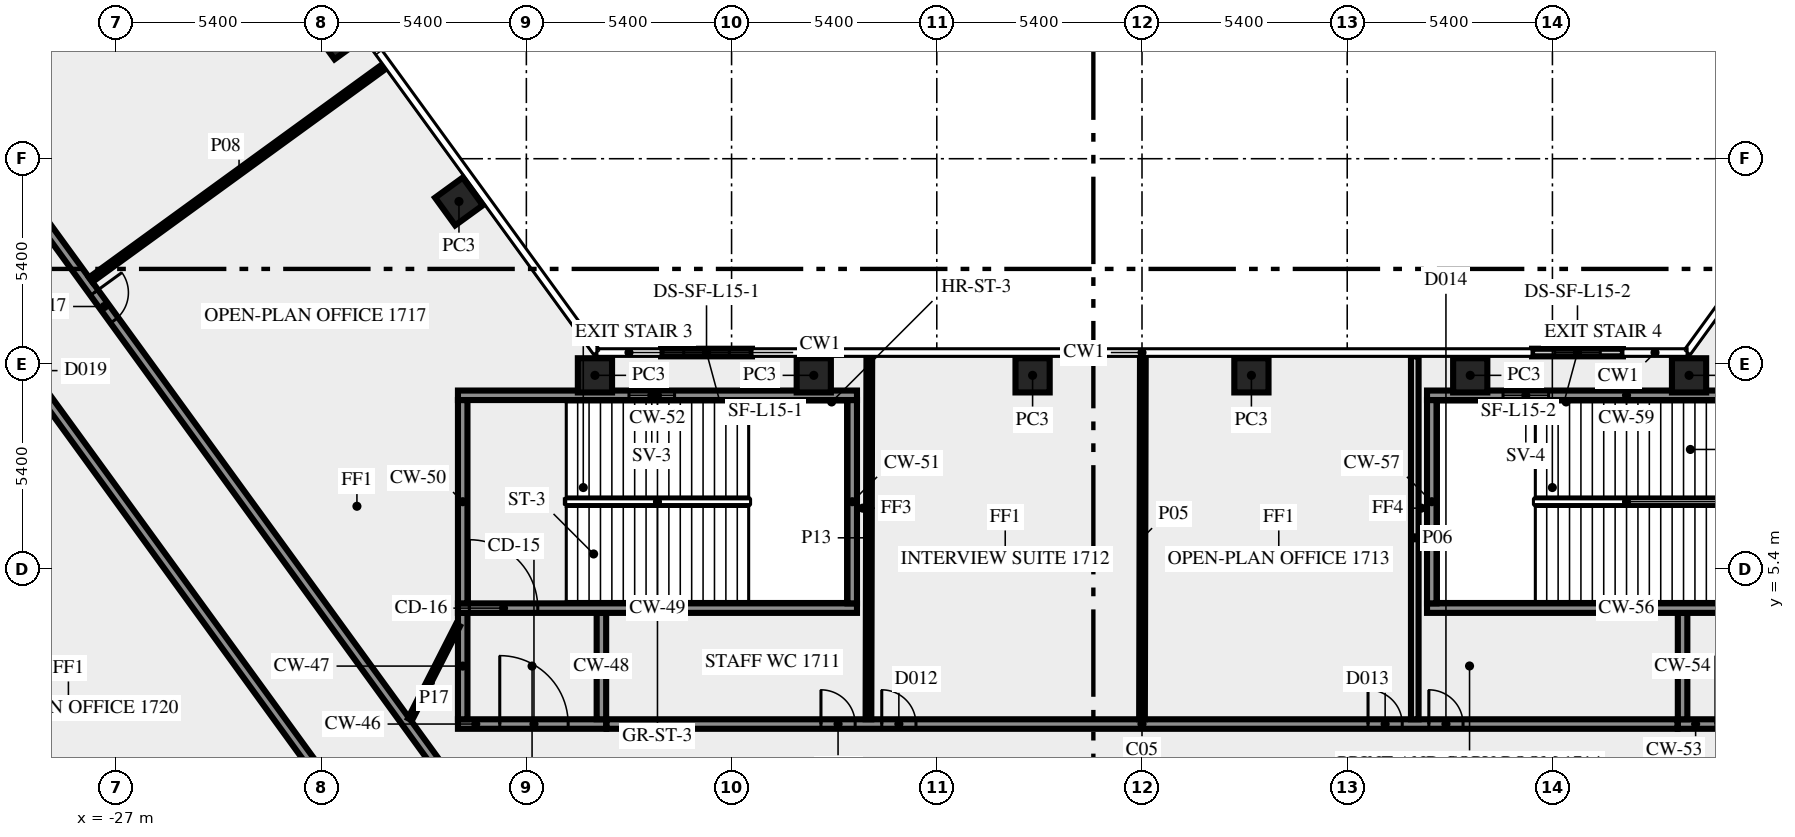
"""IFC4 building model, lengths in metres.
Left out: names, types, materials, properties, quantities, classifications, styles, units other than length and angle.
Written with IfcOpenShell. Run it as: python <this file> out.ifc"""

import sys

from ifc_helpers import new_model, si_unit, direction, frame, frame_2d, origin, origin_2d, place, context, subcontext, project, spatial, rectangle, extrude, element, fill, save


model = new_model("IFC4")
c1 = context("Model", 3, precision=1e-05, world=origin(), true_north=direction((0.0, 1.0)))
c2 = subcontext(c1, "Body", "Model", "MODEL_VIEW")
j1 = project(units=[si_unit("LENGTHUNIT", "METRE"), si_unit("PLANEANGLEUNIT", "RADIAN")], contexts=[c1])
p1 = place(None, origin())
s1 = spatial("IfcSite", under=j1, at=p1, CompositionType="ELEMENT")
p2 = place(p1, origin())
s2 = spatial("IfcBuilding", under=s1, at=p2, CompositionType="ELEMENT")
p3 = place(p2, frame((0.0, 0.0, 75.0)))
s3 = spatial("IfcBuildingStorey", under=s2, at=p3, CompositionType="ELEMENT", Elevation=75.0)
for number, where, z_axis, x_axis in (
    (1, (-17.974, 15.075, 0.0), (0.0, 0.0, 1.0), (-0.588, 0.809, 0.0)),
    (2, (-21.147, 19.444, 0.0), (0.0, 0.0, 1.0), (-0.588, 0.809, 0.0)),
    (3, (14.395, 10.5, 0.0), (0.0, 0.0, 1.0), (-1.0, 0.0, 0.0)),
    (4, (8.637, 10.5, 0.0), (0.0, 0.0, 1.0), (-1.0, 0.0, 0.0)),
    (5, (2.879, 10.5, 0.0), (0.0, 0.0, 1.0), (-1.0, 0.0, 0.0)),
    (6, (-2.879, 10.5, 0.0), (0.0, 0.0, 1.0), (-1.0, 0.0, 0.0)),
    (7, (-8.637, 10.5, 0.0), (0.0, 0.0, 1.0), (-1.0, 0.0, 0.0)),
    (8, (-14.395, 10.5, 0.0), (0.0, 0.0, 1.0), (-1.0, 0.0, 0.0)),
):
    element("IfcColumn", number, at=place(p3, frame(where, z_axis=z_axis, x_axis=x_axis)), inside=s3, PredefinedType="COLUMN", context=c2, shape_type="SweptSolid", body=[
        extrude(rectangle(XDim=0.9, YDim=0.9, at=origin_2d()), origin(), (0.0, 0.0, 1.0), 3.4),
    ])
p4 = place(p3, frame((12.655, 11.1, 0.0), z_axis=(0.0, 0.0, 1.0), x_axis=(-1.0, 0.0, 0.0)))
e9 = element("IfcWall", 9, at=p4, inside=s3, PredefinedType="SOLIDWALL", context=c2, shape_type="SweptSolid", body=[
    extrude(rectangle(XDim=2.392, YDim=0.2, at=frame_2d((1.196, 0.0))), origin(), (0.0, 0.0, 1.0), 3.4),
])
p5 = place(p4, frame((0.596, 0.0, 1.0)))
e10 = element("IfcOpeningElement", 10, at=p5, cuts=e9, PredefinedType="OPENING", context=c2, shape_type="SweptSolid", body=[
    extrude(rectangle(XDim=1.2, YDim=1.2, at=frame_2d((0.6, 0.6))), frame((0.0, 0.11, 0.0), z_axis=(0.0, -1.0, 0.0), x_axis=(1.0, 0.0, 0.0)), (0.0, 0.0, 1.0), 0.22),
])
p6 = place(p3, frame((-10.263, 11.1, 0.0), z_axis=(0.0, 0.0, 1.0), x_axis=(-1.0, 0.0, 0.0)))
e11 = element("IfcWall", 11, at=p6, inside=s3, PredefinedType="SOLIDWALL", context=c2, shape_type="SweptSolid", body=[
    extrude(rectangle(XDim=2.392, YDim=0.2, at=frame_2d((1.196, 0.0))), origin(), (0.0, 0.0, 1.0), 3.4),
])
p7 = place(p6, frame((0.596, 0.0, 1.0)))
e12 = element("IfcOpeningElement", 12, at=p7, cuts=e11, PredefinedType="OPENING", context=c2, shape_type="SweptSolid", body=[
    extrude(rectangle(XDim=1.2, YDim=1.2, at=frame_2d((0.6, 0.6))), frame((0.0, 0.11, 0.0), z_axis=(0.0, -1.0, 0.0), x_axis=(1.0, 0.0, 0.0)), (0.0, 0.0, 1.0), 0.22),
])
p8 = place(p3, frame((-18.0, 1.325, 0.0), z_axis=(0.0, 0.0, 1.0), x_axis=(1.0, 0.0, 0.0)))
e13 = element("IfcWall", 13, at=p8, inside=s3, PredefinedType="SHEAR", context=c2, shape_type="SweptSolid", body=[
    extrude(rectangle(XDim=3.9, YDim=0.25, at=frame_2d((1.95, 0.0))), origin(), (0.0, 0.0, 1.0), 3.4),
])
p9 = place(p8, frame((1.1, 0.0, 0.0)))
e14 = element("IfcOpeningElement", 14, at=p9, cuts=e13, PredefinedType="OPENING", context=c2, shape_type="SweptSolid", body=[
    extrude(rectangle(XDim=1.8, YDim=2.1, at=frame_2d((0.9, 1.05))), frame((0.0, 0.135, 0.0), z_axis=(0.0, -1.0, 0.0), x_axis=(1.0, 0.0, 0.0)), (0.0, 0.0, 1.0), 0.27),
])
for number, where, z_axis, x_axis in (
    (15, (-17.875, 1.45, 0.0), (0.0, 0.0, 1.0), (0.0, 1.0, 0.0)),
    (16, (-14.225, 1.45, 0.0), (0.0, 0.0, 1.0), (0.0, 1.0, 0.0)),
):
    element("IfcWall", number, at=place(p3, frame(where, z_axis=z_axis, x_axis=x_axis)), inside=s3, PredefinedType="SHEAR", context=c2, shape_type="SweptSolid", body=[
        extrude(rectangle(XDim=2.8, YDim=0.25, at=frame_2d((1.4, 0.0))), origin(), (0.0, 0.0, 1.0), 3.4),
    ])
p10 = place(p3, frame((-18.0, 4.375, 0.0), z_axis=(0.0, 0.0, 1.0), x_axis=(1.0, 0.0, 0.0)))
e17 = element("IfcWall", 17, at=p10, inside=s3, PredefinedType="SHEAR", context=c2, shape_type="SweptSolid", body=[
    extrude(rectangle(XDim=10.5, YDim=0.25, at=frame_2d((5.25, 0.0))), origin(), (0.0, 0.0, 1.0), 3.4),
])
p11 = place(p10, frame((0.3, 0.0, 0.0)))
e18 = element("IfcOpeningElement", 18, at=p11, cuts=e17, PredefinedType="OPENING", context=c2, shape_type="SweptSolid", body=[
    extrude(rectangle(XDim=1.8, YDim=2.1, at=frame_2d((0.9, 1.05))), frame((0.0, 0.135, 0.0), z_axis=(0.0, -1.0, 0.0), x_axis=(1.0, 0.0, 0.0)), (0.0, 0.0, 1.0), 0.27),
])
for number, where, z_axis, x_axis in (
    (19, (-17.875, 4.5, 0.0), (0.0, 0.0, 1.0), (0.0, 1.0, 0.0)),
    (20, (-7.625, 4.5, 0.0), (0.0, 0.0, 1.0), (0.0, 1.0, 0.0)),
):
    element("IfcWall", number, at=place(p3, frame(where, z_axis=z_axis, x_axis=x_axis)), inside=s3, PredefinedType="SHEAR", context=c2, shape_type="SweptSolid", body=[
        extrude(rectangle(XDim=5.35, YDim=0.25, at=frame_2d((2.675, 0.0))), origin(), (0.0, 0.0, 1.0), 3.4),
    ])
p12 = place(p3, frame((-18.0, 9.975, 0.0), z_axis=(0.0, 0.0, 1.0), x_axis=(1.0, 0.0, 0.0)))
e21 = element("IfcWall", 21, at=p12, inside=s3, PredefinedType="SHEAR", context=c2, shape_type="SweptSolid", body=[
    extrude(rectangle(XDim=10.5, YDim=0.25, at=frame_2d((5.25, 0.0))), origin(), (0.0, 0.0, 1.0), 3.4),
])
p13 = place(p12, frame((4.5, 0.0, 1.0)))
e22 = element("IfcOpeningElement", 22, at=p13, cuts=e21, PredefinedType="OPENING", context=c2, shape_type="SweptSolid", body=[
    extrude(rectangle(XDim=1.2, YDim=1.2, at=frame_2d((0.6, 0.6))), frame((0.0, 0.135, 0.0), z_axis=(0.0, -1.0, 0.0), x_axis=(1.0, 0.0, 0.0)), (0.0, 0.0, 1.0), 0.27),
])
p14 = place(p3, frame((14.1, 1.325, 0.0), z_axis=(0.0, 0.0, 1.0), x_axis=(1.0, 0.0, 0.0)))
e23 = element("IfcWall", 23, at=p14, inside=s3, PredefinedType="SHEAR", context=c2, shape_type="SweptSolid", body=[
    extrude(rectangle(XDim=3.9, YDim=0.25, at=frame_2d((1.95, 0.0))), origin(), (0.0, 0.0, 1.0), 3.4),
])
p15 = place(p14, frame((1.0, 0.0, 0.0)))
e24 = element("IfcOpeningElement", 24, at=p15, cuts=e23, PredefinedType="OPENING", context=c2, shape_type="SweptSolid", body=[
    extrude(rectangle(XDim=1.8, YDim=2.1, at=frame_2d((0.9, 1.05))), frame((0.0, 0.135, 0.0), z_axis=(0.0, -1.0, 0.0), x_axis=(1.0, 0.0, 0.0)), (0.0, 0.0, 1.0), 0.27),
])
p16 = place(p3, frame((14.225, 1.45, 0.0), z_axis=(0.0, 0.0, 1.0), x_axis=(0.0, 1.0, 0.0)))
e25 = element("IfcWall", 25, at=p16, inside=s3, PredefinedType="SHEAR", context=c2, shape_type="SweptSolid", body=[
    extrude(rectangle(XDim=2.8, YDim=0.25, at=frame_2d((1.4, 0.0))), origin(), (0.0, 0.0, 1.0), 3.4),
])
p17 = place(p3, frame((7.5, 4.375, 0.0), z_axis=(0.0, 0.0, 1.0), x_axis=(1.0, 0.0, 0.0)))
e26 = element("IfcWall", 26, at=p17, inside=s3, PredefinedType="SHEAR", context=c2, shape_type="SweptSolid", body=[
    extrude(rectangle(XDim=10.5, YDim=0.25, at=frame_2d((5.25, 0.0))), origin(), (0.0, 0.0, 1.0), 3.4),
])
p18 = place(p17, frame((8.4, 0.0, 0.0)))
e27 = element("IfcOpeningElement", 27, at=p18, cuts=e26, PredefinedType="OPENING", context=c2, shape_type="SweptSolid", body=[
    extrude(rectangle(XDim=1.8, YDim=2.1, at=frame_2d((0.9, 1.05))), frame((0.0, 0.135, 0.0), z_axis=(0.0, -1.0, 0.0), x_axis=(1.0, 0.0, 0.0)), (0.0, 0.0, 1.0), 0.27),
])
p19 = place(p3, frame((7.625, 4.5, 0.0), z_axis=(0.0, 0.0, 1.0), x_axis=(0.0, 1.0, 0.0)))
e28 = element("IfcWall", 28, at=p19, inside=s3, PredefinedType="SHEAR", context=c2, shape_type="SweptSolid", body=[
    extrude(rectangle(XDim=5.35, YDim=0.25, at=frame_2d((2.675, 0.0))), origin(), (0.0, 0.0, 1.0), 3.4),
])
p20 = place(p3, frame((7.5, 9.975, 0.0), z_axis=(0.0, 0.0, 1.0), x_axis=(1.0, 0.0, 0.0)))
e29 = element("IfcWall", 29, at=p20, inside=s3, PredefinedType="SHEAR", context=c2, shape_type="SweptSolid", body=[
    extrude(rectangle(XDim=10.5, YDim=0.25, at=frame_2d((5.25, 0.0))), origin(), (0.0, 0.0, 1.0), 3.4),
])
p21 = place(p20, frame((2.0, 0.0, 1.0)))
e30 = element("IfcOpeningElement", 30, at=p21, cuts=e29, PredefinedType="OPENING", context=c2, shape_type="SweptSolid", body=[
    extrude(rectangle(XDim=1.2, YDim=1.2, at=frame_2d((0.6, 0.6))), frame((0.0, 0.135, 0.0), z_axis=(0.0, -1.0, 0.0), x_axis=(1.0, 0.0, 0.0)), (0.0, 0.0, 1.0), 0.27),
])
p22 = place(p3, frame((-20.531, -1.523, 0.0), z_axis=(0.0, 0.0, 1.0), x_axis=(-0.587784593204, 0.809017473231, 0.0)))
e31 = element("IfcWall", 31, at=p22, inside=s3, PredefinedType="SOLIDWALL", context=c2, shape_type="SweptSolid", body=[
    extrude(rectangle(XDim=44.67, YDim=0.25, at=frame_2d((22.335, 0.0))), origin(), (0.0, 0.0, 1.0), 3.4),
])
p23 = place(p22, frame((0.533, 0.0, 0.0)))
e32 = element("IfcOpeningElement", 32, at=p23, cuts=e31, PredefinedType="OPENING", context=c2, shape_type="SweptSolid", body=[
    extrude(rectangle(XDim=0.9, YDim=2.1, at=frame_2d((0.45, 1.05))), frame((0.0, 0.135, 0.0), z_axis=(0.0, -1.0, 0.0), x_axis=(1.0, 0.0, 0.0)), (0.0, 0.0, 1.0), 0.27),
])
p24 = place(p22, frame((32.531, 0.0, 0.0)))
e33 = element("IfcOpeningElement", 33, at=p24, cuts=e31, PredefinedType="OPENING", context=c2, shape_type="SweptSolid", body=[
    extrude(rectangle(XDim=1.8, YDim=2.1, at=frame_2d((0.9, 1.05))), frame((0.0, 0.135, 0.0), z_axis=(0.0, -1.0, 0.0), x_axis=(1.0, 0.0, 0.0)), (0.0, 0.0, 1.0), 0.27),
])
p25 = place(p22, frame((14.566, 0.0, 0.0)))
e34 = element("IfcOpeningElement", 34, at=p25, cuts=e31, PredefinedType="OPENING", context=c2, shape_type="SweptSolid", body=[
    extrude(rectangle(XDim=0.9, YDim=2.1, at=frame_2d((0.45, 1.05))), frame((0.0, 0.135, 0.0), z_axis=(0.0, -1.0, 0.0), x_axis=(1.0, 0.0, 0.0)), (0.0, 0.0, 1.0), 0.27),
])
p26 = place(p3, frame((-37.232, 25.972, 0.0), z_axis=(0.0, 0.0, 1.0), x_axis=(0.587786323093, -0.809016216391, 0.0)))
e35 = element("IfcWall", 35, at=p26, inside=s3, PredefinedType="SOLIDWALL", context=c2, shape_type="SweptSolid", body=[
    extrude(rectangle(XDim=33.493, YDim=0.25, at=frame_2d((16.747, 0.0))), origin(), (0.0, 0.0, 1.0), 3.4),
])
p27 = place(p26, frame((16.435, 0.0, 0.0)))
e36 = element("IfcOpeningElement", 36, at=p27, cuts=e35, PredefinedType="OPENING", context=c2, shape_type="SweptSolid", body=[
    extrude(rectangle(XDim=0.9, YDim=2.1, at=frame_2d((0.45, 1.05))), frame((0.0, 0.135, 0.0), z_axis=(0.0, -1.0, 0.0), x_axis=(1.0, 0.0, 0.0)), (0.0, 0.0, 1.0), 0.27),
])
p28 = place(p26, frame((7.137, 0.0, 0.0)))
e37 = element("IfcOpeningElement", 37, at=p28, cuts=e35, PredefinedType="OPENING", context=c2, shape_type="SweptSolid", body=[
    extrude(rectangle(XDim=1.8, YDim=2.1, at=frame_2d((0.9, 1.05))), frame((0.0, 0.135, 0.0), z_axis=(0.0, -1.0, 0.0), x_axis=(1.0, 0.0, 0.0)), (0.0, 0.0, 1.0), 0.27),
])
p29 = place(p3, frame((-14.09, 1.325, 0.0), z_axis=(0.0, 0.0, 1.0), x_axis=(1.0, 0.0, 0.0)))
e38 = element("IfcWall", 38, at=p29, inside=s3, PredefinedType="SOLIDWALL", context=c2, shape_type="SweptSolid", body=[
    extrude(rectangle(XDim=28.18, YDim=0.25, at=frame_2d((14.09, 0.0))), origin(), (0.0, 0.0, 1.0), 3.4),
])
p30 = place(p29, frame((20.038, 0.0, 0.0)))
e39 = element("IfcOpeningElement", 39, at=p30, cuts=e38, PredefinedType="OPENING", context=c2, shape_type="SweptSolid", body=[
    extrude(rectangle(XDim=0.9, YDim=2.1, at=frame_2d((0.45, 1.05))), frame((0.0, 0.135, 0.0), z_axis=(0.0, -1.0, 0.0), x_axis=(1.0, 0.0, 0.0)), (0.0, 0.0, 1.0), 0.27),
])
p31 = place(p29, frame((7.242, 0.0, 0.0)))
e40 = element("IfcOpeningElement", 40, at=p31, cuts=e38, PredefinedType="OPENING", context=c2, shape_type="SweptSolid", body=[
    extrude(rectangle(XDim=0.9, YDim=2.1, at=frame_2d((0.45, 1.05))), frame((0.0, 0.135, 0.0), z_axis=(0.0, -1.0, 0.0), x_axis=(1.0, 0.0, 0.0)), (0.0, 0.0, 1.0), 0.27),
])
p32 = place(p29, frame((21.638, 0.0, 0.0)))
e41 = element("IfcOpeningElement", 41, at=p32, cuts=e38, PredefinedType="OPENING", context=c2, shape_type="SweptSolid", body=[
    extrude(rectangle(XDim=0.9, YDim=2.1, at=frame_2d((0.45, 1.05))), frame((0.0, 0.135, 0.0), z_axis=(0.0, -1.0, 0.0), x_axis=(1.0, 0.0, 0.0)), (0.0, 0.0, 1.0), 0.27),
])
p33 = place(p29, frame((5.642, 0.0, 0.0)))
e42 = element("IfcOpeningElement", 42, at=p33, cuts=e38, PredefinedType="OPENING", context=c2, shape_type="SweptSolid", body=[
    extrude(rectangle(XDim=0.9, YDim=2.1, at=frame_2d((0.45, 1.05))), frame((0.0, 0.135, 0.0), z_axis=(0.0, -1.0, 0.0), x_axis=(1.0, 0.0, 0.0)), (0.0, 0.0, 1.0), 0.27),
])
p34 = place(p3, frame((0.023, 11.0, 0.0), z_axis=(0.0, 0.0, 1.0), x_axis=(-0.002377476217, -0.999997173799, 0.0)))
e43 = element("IfcWall", 43, at=p34, inside=s3, PredefinedType="PARTITIONING", context=c2, shape_type="SweptSolid", body=[
    extrude(rectangle(XDim=9.55, YDim=0.15, at=frame_2d((4.775, 0.0))), origin(), (0.0, 0.0, 1.0), 2.5),
])
p35 = place(p3, frame((7.178, 1.45, 0.0), z_axis=(0.0, 0.0, 1.0), x_axis=(0.0, 1.0, 0.0)))
e44 = element("IfcWall", 44, at=p35, inside=s3, PredefinedType="SOLIDWALL", context=c2, shape_type="SweptSolid", body=[
    extrude(rectangle(XDim=9.55, YDim=0.2, at=frame_2d((4.775, 0.0))), origin(), (0.0, 0.0, 1.0), 2.5),
])
p36 = place(p3, frame((-19.857, 18.689, 0.0), z_axis=(0.0, 0.0, 1.0), x_axis=(-0.809002920164, -0.587804623294, 0.0)))
e45 = element("IfcWall", 45, at=p36, inside=s3, PredefinedType="PARTITIONING", context=c2, shape_type="SweptSolid", body=[
    extrude(rectangle(XDim=9.651, YDim=0.15, at=frame_2d((4.825, 0.0))), origin(), (0.0, 0.0, 1.0), 2.5),
])
p37 = place(p3, frame((-7.175, 11.0, 0.0), z_axis=(0.0, 0.0, 1.0), x_axis=(-0.002377476217, -0.999997173799, 0.0)))
e46 = element("IfcWall", 46, at=p37, inside=s3, PredefinedType="PARTITIONING", context=c2, shape_type="SweptSolid", body=[
    extrude(rectangle(XDim=9.55, YDim=0.15, at=frame_2d((4.775, 0.0))), origin(), (0.0, 0.0, 1.0), 2.5),
])
p38 = place(p3, frame((-19.261, 1.45, 0.0), z_axis=(0.0, 0.0, 1.0), x_axis=(0.453950796792, 0.891026752736, 0.0)))
e47 = element("IfcWall", 47, at=p38, inside=s3, PredefinedType="PARTITIONING", context=c2, shape_type="SweptSolid", body=[
    extrude(rectangle(XDim=2.778, YDim=0.12, at=frame_2d((1.389, 0.0))), origin(), (0.0, 0.0, 1.0), 3.4),
])
p39 = place(p5, origin())
e48 = element("IfcWindow", 48, at=p39, inside=s3, PartitioningType="SINGLE_PANEL", PredefinedType="WINDOW", context=c2, shape_type="SweptSolid", body=[
    extrude(rectangle(XDim=1.2, YDim=1.2, at=frame_2d((0.6, 0.6))), frame((0.0, 0.03, 0.0), z_axis=(0.0, -1.0, 0.0), x_axis=(1.0, 0.0, 0.0)), (0.0, 0.0, 1.0), 0.06),
])
fill(e10, e48)
p40 = place(p7, origin())
e49 = element("IfcWindow", 49, at=p40, inside=s3, PartitioningType="SINGLE_PANEL", PredefinedType="WINDOW", context=c2, shape_type="SweptSolid", body=[
    extrude(rectangle(XDim=1.2, YDim=1.2, at=frame_2d((0.6, 0.6))), frame((0.0, 0.03, 0.0), z_axis=(0.0, -1.0, 0.0), x_axis=(1.0, 0.0, 0.0)), (0.0, 0.0, 1.0), 0.06),
])
fill(e12, e49)
p41 = place(p9, origin())
e50 = element("IfcDoor", 50, at=p41, inside=s3, OperationType="DOUBLE_DOOR_SINGLE_SWING", PredefinedType="DOOR", context=c2, shape_type="SweptSolid", body=[
    extrude(rectangle(XDim=1.8, YDim=2.1, at=frame_2d((0.9, 1.05))), frame((0.0, 0.025, 0.0), z_axis=(0.0, -1.0, 0.0), x_axis=(1.0, 0.0, 0.0)), (0.0, 0.0, 1.0), 0.05),
])
fill(e14, e50)
p42 = place(p11, origin())
e51 = element("IfcDoor", 51, at=p42, inside=s3, OperationType="DOUBLE_DOOR_SINGLE_SWING", PredefinedType="DOOR", context=c2, shape_type="SweptSolid", body=[
    extrude(rectangle(XDim=1.8, YDim=2.1, at=frame_2d((0.9, 1.05))), frame((0.0, 0.025, 0.0), z_axis=(0.0, -1.0, 0.0), x_axis=(1.0, 0.0, 0.0)), (0.0, 0.0, 1.0), 0.05),
])
fill(e18, e51)
p43 = place(p13, origin())
e52 = element("IfcWindow", 52, at=p43, inside=s3, PartitioningType="SINGLE_PANEL", PredefinedType="WINDOW", context=c2, shape_type="SweptSolid", body=[
    extrude(rectangle(XDim=1.2, YDim=1.2, at=frame_2d((0.6, 0.6))), frame((0.0, 0.03, 0.0), z_axis=(0.0, -1.0, 0.0), x_axis=(1.0, 0.0, 0.0)), (0.0, 0.0, 1.0), 0.06),
])
fill(e22, e52)
p44 = place(p15, origin())
e53 = element("IfcDoor", 53, at=p44, inside=s3, OperationType="DOUBLE_DOOR_SINGLE_SWING", PredefinedType="DOOR", context=c2, shape_type="SweptSolid", body=[
    extrude(rectangle(XDim=1.8, YDim=2.1, at=frame_2d((0.9, 1.05))), frame((0.0, 0.025, 0.0), z_axis=(0.0, -1.0, 0.0), x_axis=(1.0, 0.0, 0.0)), (0.0, 0.0, 1.0), 0.05),
])
fill(e24, e53)
p45 = place(p21, origin())
e54 = element("IfcWindow", 54, at=p45, inside=s3, PartitioningType="SINGLE_PANEL", PredefinedType="WINDOW", context=c2, shape_type="SweptSolid", body=[
    extrude(rectangle(XDim=1.2, YDim=1.2, at=frame_2d((0.6, 0.6))), frame((0.0, 0.03, 0.0), z_axis=(0.0, -1.0, 0.0), x_axis=(1.0, 0.0, 0.0)), (0.0, 0.0, 1.0), 0.06),
])
fill(e30, e54)
p46 = place(p30, origin())
e55 = element("IfcDoor", 55, at=p46, inside=s3, OperationType="SINGLE_SWING_RIGHT", PredefinedType="DOOR", context=c2, shape_type="SweptSolid", body=[
    extrude(rectangle(XDim=0.9, YDim=2.1, at=frame_2d((0.45, 1.05))), frame((0.0, 0.025, 0.0), z_axis=(0.0, -1.0, 0.0), x_axis=(1.0, 0.0, 0.0)), (0.0, 0.0, 1.0), 0.05),
])
fill(e39, e55)
p47 = place(p27, origin())
e56 = element("IfcDoor", 56, at=p47, inside=s3, OperationType="SINGLE_SWING_LEFT", PredefinedType="DOOR", context=c2, shape_type="SweptSolid", body=[
    extrude(rectangle(XDim=0.9, YDim=2.1, at=frame_2d((0.45, 1.05))), frame((0.0, 0.025, 0.0), z_axis=(0.0, -1.0, 0.0), x_axis=(1.0, 0.0, 0.0)), (0.0, 0.0, 1.0), 0.05),
])
fill(e36, e56)
p48 = place(p31, origin())
e57 = element("IfcDoor", 57, at=p48, inside=s3, OperationType="SINGLE_SWING_LEFT", PredefinedType="DOOR", context=c2, shape_type="SweptSolid", body=[
    extrude(rectangle(XDim=0.9, YDim=2.1, at=frame_2d((0.45, 1.05))), frame((0.0, 0.025, 0.0), z_axis=(0.0, -1.0, 0.0), x_axis=(1.0, 0.0, 0.0)), (0.0, 0.0, 1.0), 0.05),
])
fill(e40, e57)
p49 = place(p32, origin())
e58 = element("IfcDoor", 58, at=p49, inside=s3, OperationType="SINGLE_SWING_LEFT", PredefinedType="DOOR", context=c2, shape_type="SweptSolid", body=[
    extrude(rectangle(XDim=0.9, YDim=2.1, at=frame_2d((0.45, 1.05))), frame((0.0, 0.025, 0.0), z_axis=(0.0, -1.0, 0.0), x_axis=(1.0, 0.0, 0.0)), (0.0, 0.0, 1.0), 0.05),
])
fill(e41, e58)
p50 = place(p33, origin())
e59 = element("IfcDoor", 59, at=p50, inside=s3, OperationType="SINGLE_SWING_RIGHT", PredefinedType="DOOR", context=c2, shape_type="SweptSolid", body=[
    extrude(rectangle(XDim=0.9, YDim=2.1, at=frame_2d((0.45, 1.05))), frame((0.0, 0.025, 0.0), z_axis=(0.0, -1.0, 0.0), x_axis=(1.0, 0.0, 0.0)), (0.0, 0.0, 1.0), 0.05),
])
fill(e42, e59)
save(model, sys.argv[1])
